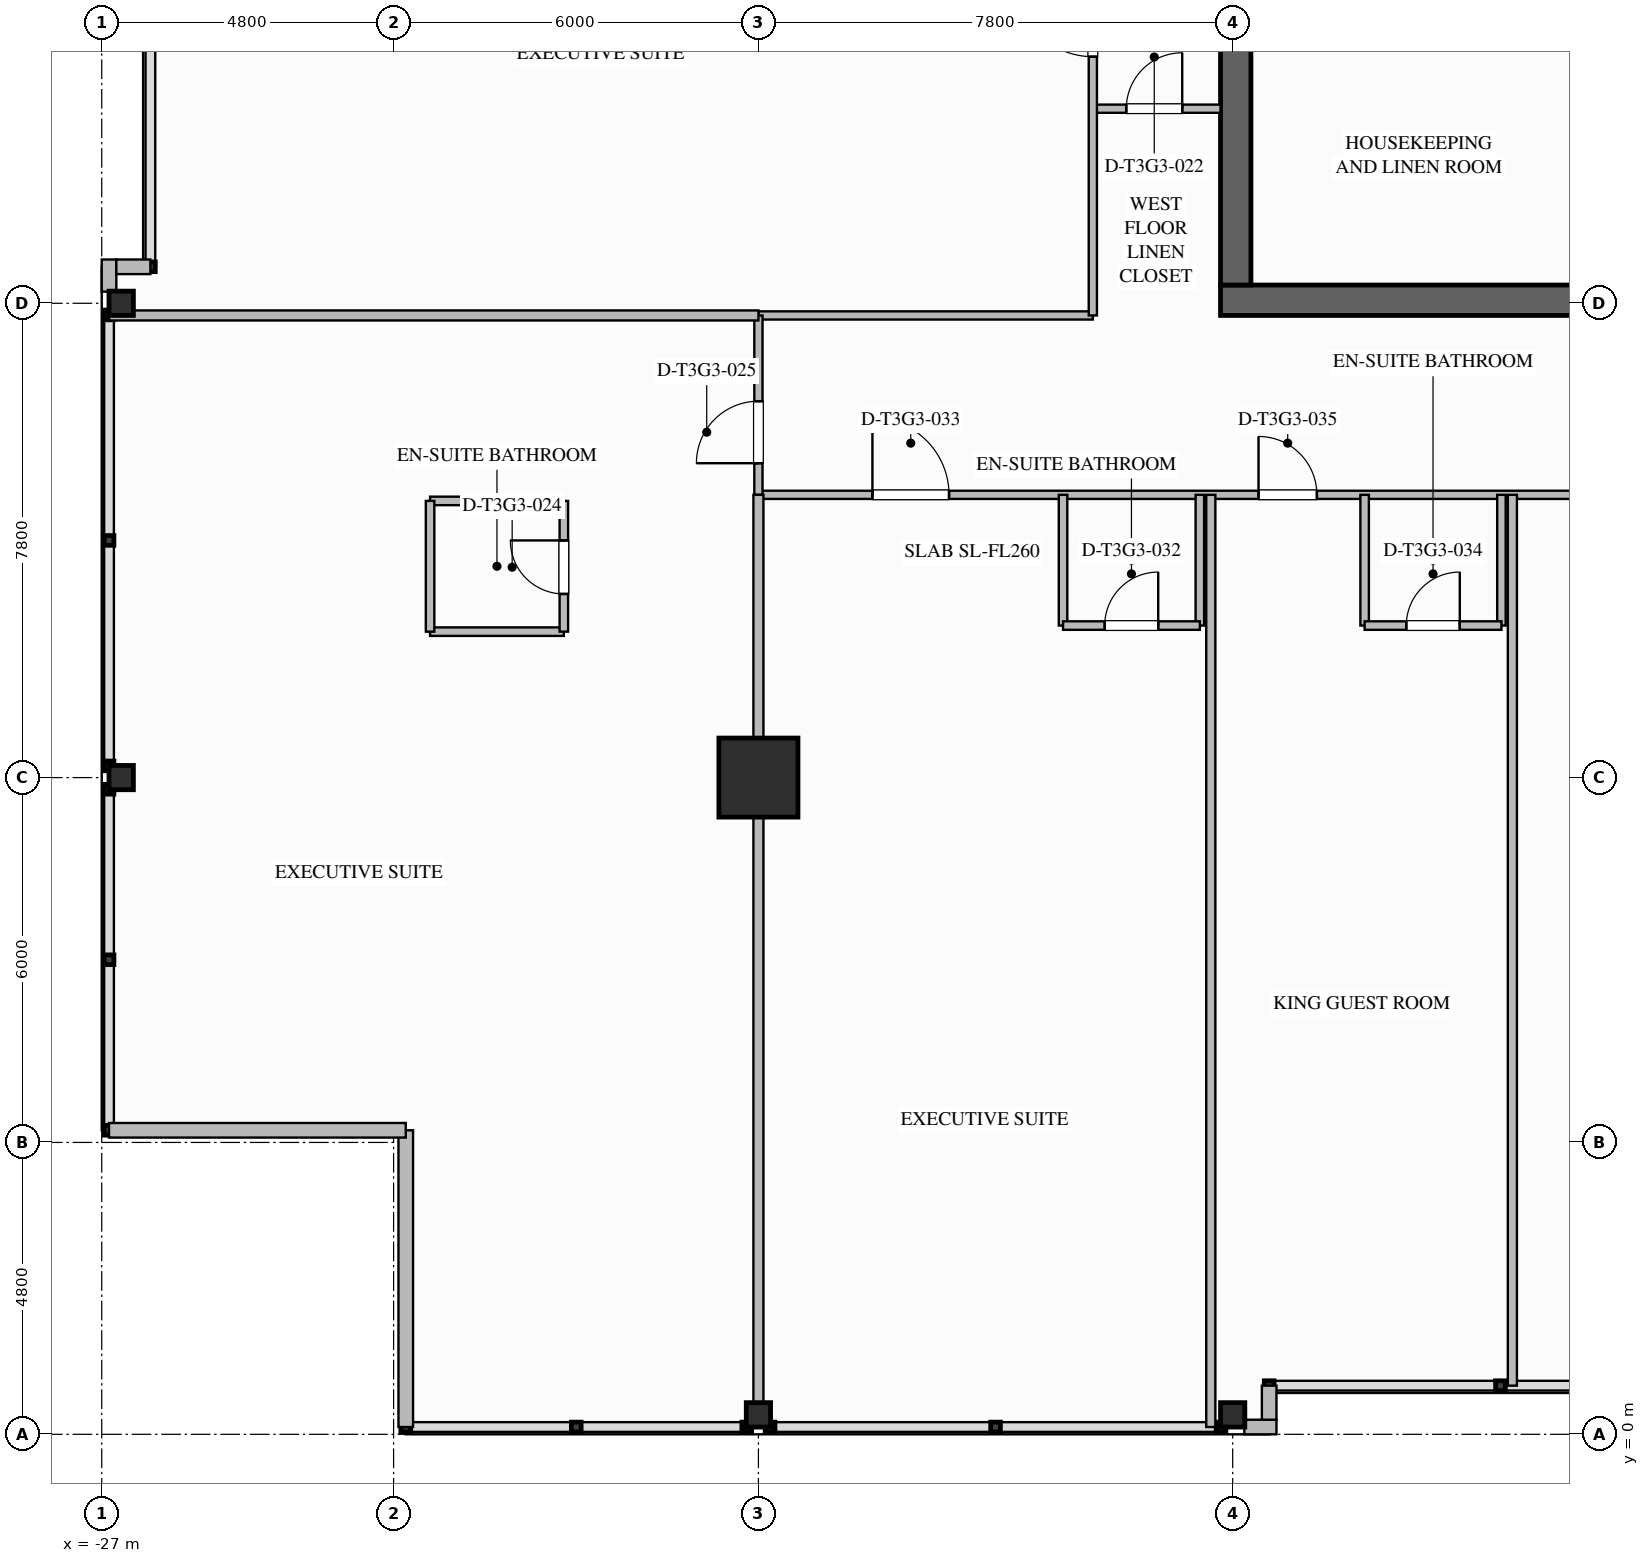
"""IFC4 building model, lengths in metres.
Left out: names, types, materials, properties, quantities, classifications, styles, units other than length and angle.
Written with IfcOpenShell. Run it as: python <this file> out.ifc"""

import sys

from ifc_helpers import new_model, si_unit, direction, frame, frame_2d, origin, origin_2d, place, context, subcontext, project, spatial, rectangle, i_section, extrude, element, fill, save


model = new_model("IFC4")
c1 = context("Model", 3, precision=1e-05, world=origin(), true_north=direction((0.0, 1.0)))
c2 = subcontext(c1, "Body", "Model", "MODEL_VIEW")
j1 = project(units=[si_unit("LENGTHUNIT", "METRE"), si_unit("PLANEANGLEUNIT", "RADIAN")], contexts=[c1])
p1 = place(None, origin())
s1 = spatial("IfcSite", under=j1, at=p1, CompositionType="ELEMENT")
p2 = place(p1, origin())
s2 = spatial("IfcBuilding", under=s1, at=p2, CompositionType="ELEMENT")
p3 = place(p2, frame((0.0, 0.0, 178.8)))
s3 = spatial("IfcBuildingStorey", under=s2, at=p3, CompositionType="ELEMENT", Elevation=178.8)
p4 = place(p3, frame((8.6, 18.65, 0.0), z_axis=(0.0, 0.0, 1.0), x_axis=(-1.0, 0.0, 0.0)))
e1 = element("IfcWall", 1, at=p4, inside=s3, PredefinedType="SHEAR", context=c2, shape_type="SweptSolid", body=[
    extrude(rectangle(XDim=17.2, YDim=0.5, at=frame_2d((8.6, 0.0))), origin(), (0.0, 0.0, 1.0), 3.55),
])
p5 = place(p3, frame((-8.35, 18.9, 0.0), z_axis=(0.0, 0.0, 1.0), x_axis=(0.0, 1.0, 0.0)))
e2 = element("IfcWall", 2, at=p5, inside=s3, PredefinedType="SHEAR", context=c2, shape_type="SweptSolid", body=[
    extrude(rectangle(XDim=16.2, YDim=0.5, at=frame_2d((8.1, 0.0))), origin(), (0.0, 0.0, 1.0), 3.55),
])
p6 = place(p5, frame((12.02, 0.0, 0.0)))
e3 = element("IfcOpeningElement", 3, at=p6, cuts=e2, PredefinedType="OPENING", context=c2, shape_type="SweptSolid", body=[
    extrude(rectangle(XDim=1.08, YDim=2.04, at=frame_2d((0.54, 1.02))), frame((0.0, 0.26, 0.0), z_axis=(0.0, -1.0, 0.0), x_axis=(1.0, 0.0, 0.0)), (0.0, 0.0, 1.0), 0.52),
])
p7 = place(p5, frame((4.5, 0.0, 0.0)))
e4 = element("IfcOpeningElement", 4, at=p7, cuts=e2, PredefinedType="OPENING", context=c2, shape_type="SweptSolid", body=[
    extrude(rectangle(XDim=1.08, YDim=2.04, at=frame_2d((0.54, 1.02))), frame((0.0, 0.26, 0.0), z_axis=(0.0, -1.0, 0.0), x_axis=(1.0, 0.0, 0.0)), (0.0, 0.0, 1.0), 0.52),
])
p8 = place(p3, frame((-16.2, 10.8, 0.0), z_axis=(0.0, 0.0, 1.0), x_axis=(1.0, 0.0, 0.0)))
e5 = element("IfcColumn", 5, at=p8, inside=s3, PredefinedType="COLUMN", context=c2, shape_type="SweptSolid", body=[
    extrude(rectangle(XDim=1.3, YDim=1.3, at=origin_2d()), origin(), (0.0, 0.0, 1.0), 3.55),
])
for number, where, z_axis, x_axis in (
    (6, (-26.68, 10.8, 0.0), (0.0, 0.0, 1.0), (1.0, 0.0, 0.0)),
    (7, (-26.68, 18.6, 0.0), (0.0, 0.0, 1.0), (1.0, 0.0, 0.0)),
    (8, (-16.2, 0.32, 0.0), (0.0, 0.0, 1.0), (0.0, 1.0, 0.0)),
    (9, (-8.4, 0.32, 0.0), (0.0, 0.0, 1.0), (0.0, 1.0, 0.0)),
):
    element("IfcColumn", number, at=place(p3, frame(where, z_axis=z_axis, x_axis=x_axis)), inside=s3, PredefinedType="COLUMN", context=c2, shape_type="SweptSolid", body=[
        extrude(i_section(OverallWidth=0.401, OverallDepth=0.399, WebThickness=0.025, FlangeThickness=0.04, FilletRadius=0.025, at=origin_2d()), origin(), (0.0, 0.0, 1.0), 3.547),
    ])
for number, where, z_axis, x_axis in (
    (10, (-26.88, 18.792, 0.0), (0.0, 0.0, 1.0), (0.0, 1.0, 0.0)),
    (11, (-7.68, 0.12, 0.0), (0.0, 0.0, 1.0), (-1.0, 0.0, 0.0)),
):
    element("IfcWall", number, at=place(p3, frame(where, z_axis=z_axis, x_axis=x_axis)), inside=s3, PredefinedType="STANDARD", context=c2, shape_type="SweptSolid", body=[
        extrude(rectangle(XDim=0.528, YDim=0.24, at=frame_2d((0.264, 0.0))), origin(), (0.0, 0.0, 1.0), 3.29),
    ])
for number, where, z_axis, x_axis in (
    (12, (-22.0, 0.12, 0.0), (0.0, 0.0, 1.0), (0.0, 1.0, 0.0)),
    (13, (-22.0, 5.0, 0.0), (0.0, 0.0, 1.0), (-1.0, 0.0, 0.0)),
):
    element("IfcWall", number, at=place(p3, frame(where, z_axis=z_axis, x_axis=x_axis)), inside=s3, PredefinedType="STANDARD", context=c2, shape_type="SweptSolid", body=[
        extrude(rectangle(XDim=4.88, YDim=0.24, at=frame_2d((2.44, 0.0))), origin(), (0.0, 0.0, 1.0), 3.29),
    ])
for number, where, z_axis, x_axis in (
    (14, (-26.76, 19.2, 0.0), (0.0, 0.0, 1.0), (1.0, 0.0, 0.0)),
    (15, (-7.8, 0.8, 0.0), (0.0, 0.0, 1.0), (0.0, -1.0, 0.0)),
):
    element("IfcWall", number, at=place(p3, frame(where, z_axis=z_axis, x_axis=x_axis)), inside=s3, PredefinedType="STANDARD", context=c2, shape_type="SweptSolid", body=[
        extrude(rectangle(XDim=0.56, YDim=0.24, at=frame_2d((0.28, 0.0))), origin(), (0.0, 0.0, 1.0), 3.29),
    ])
p9 = place(p3, frame((-10.7, 21.8, 0.0), z_axis=(0.0, 0.0, 1.0), x_axis=(1.0, 0.0, 0.0)))
e16 = element("IfcWall", 16, at=p9, inside=s3, PredefinedType="PARTITIONING", context=c2, shape_type="SweptSolid", body=[
    extrude(rectangle(XDim=2.1, YDim=0.135, at=frame_2d((1.05, 0.0))), origin(), (0.0, 0.0, 1.0), 3.29),
])
p10 = place(p9, frame((0.55, 0.0, 0.0)))
e17 = element("IfcOpeningElement", 17, at=p10, cuts=e16, PredefinedType="OPENING", context=c2, shape_type="SweptSolid", body=[
    extrude(rectangle(XDim=0.92, YDim=2.1, at=frame_2d((0.46, 1.05))), frame((0.0, 0.077, 0.0), z_axis=(0.0, -1.0, 0.0), x_axis=(1.0, 0.0, 0.0)), (0.0, 0.0, 1.0), 0.155),
])
p11 = place(p3, frame((-16.2, 18.4, 0.0), z_axis=(0.0, 0.0, 1.0), x_axis=(1.0, 0.0, 0.0)))
e18 = element("IfcWall", 18, at=p11, inside=s3, PredefinedType="PARTITIONING", context=c2, shape_type="SweptSolid", body=[
    extrude(rectangle(XDim=5.5, YDim=0.135, at=frame_2d((2.75, 0.0))), origin(), (0.0, 0.0, 1.0), 2.667),
])
p12 = place(p3, frame((-16.2, 15.45, 0.0), z_axis=(0.0, 0.0, 1.0), x_axis=(1.0, 0.0, 0.0)))
e19 = element("IfcWall", 19, at=p12, inside=s3, PredefinedType="PARTITIONING", context=c2, shape_type="SweptSolid", body=[
    extrude(rectangle(XDim=24.8, YDim=0.135, at=frame_2d((12.4, 0.0))), origin(), (0.0, 0.0, 1.0), 3.29),
])
p13 = place(p12, frame((1.875, 0.0, 0.0)))
e20 = element("IfcOpeningElement", 20, at=p13, cuts=e19, PredefinedType="OPENING", context=c2, shape_type="SweptSolid", body=[
    extrude(rectangle(XDim=1.26, YDim=2.2, at=frame_2d((0.63, 1.1))), frame((0.0, 0.077, 0.0), z_axis=(0.0, -1.0, 0.0), x_axis=(1.0, 0.0, 0.0)), (0.0, 0.0, 1.0), 0.155),
])
p14 = place(p12, frame((8.225, 0.0, 0.0)))
e21 = element("IfcOpeningElement", 21, at=p14, cuts=e19, PredefinedType="OPENING", context=c2, shape_type="SweptSolid", body=[
    extrude(rectangle(XDim=0.96, YDim=2.15, at=frame_2d((0.48, 1.075))), frame((0.0, 0.077, 0.0), z_axis=(0.0, -1.0, 0.0), x_axis=(1.0, 0.0, 0.0)), (0.0, 0.0, 1.0), 0.155),
])
p15 = place(p12, frame((13.745, 0.0, 0.0)))
e22 = element("IfcOpeningElement", 22, at=p15, cuts=e19, PredefinedType="OPENING", context=c2, shape_type="SweptSolid", body=[
    extrude(rectangle(XDim=1.26, YDim=2.2, at=frame_2d((0.63, 1.1))), frame((0.0, 0.077, 0.0), z_axis=(0.0, -1.0, 0.0), x_axis=(1.0, 0.0, 0.0)), (0.0, 0.0, 1.0), 0.155),
])
p16 = place(p12, frame((19.945, 0.0, 0.0)))
e23 = element("IfcOpeningElement", 23, at=p16, cuts=e19, PredefinedType="OPENING", context=c2, shape_type="SweptSolid", body=[
    extrude(rectangle(XDim=1.26, YDim=2.2, at=frame_2d((0.63, 1.1))), frame((0.0, 0.077, 0.0), z_axis=(0.0, -1.0, 0.0), x_axis=(1.0, 0.0, 0.0)), (0.0, 0.0, 1.0), 0.155),
])
p17 = place(p3, frame((-10.7, 18.4, 0.0), z_axis=(0.0, 0.0, 1.0), x_axis=(0.0, 1.0, 0.0)))
e24 = element("IfcWall", 24, at=p17, inside=s3, PredefinedType="PARTITIONING", context=c2, shape_type="SweptSolid", body=[
    extrude(rectangle(XDim=17.2, YDim=0.135, at=frame_2d((8.6, 0.0))), origin(), (0.0, 0.0, 1.0), 3.29),
])
p18 = place(p17, frame((4.255, 0.0, 0.0)))
e25 = element("IfcOpeningElement", 25, at=p18, cuts=e24, PredefinedType="OPENING", context=c2, shape_type="SweptSolid", body=[
    extrude(rectangle(XDim=1.26, YDim=2.2, at=frame_2d((0.63, 1.1))), frame((0.0, 0.077, 0.0), z_axis=(0.0, -1.0, 0.0), x_axis=(1.0, 0.0, 0.0)), (0.0, 0.0, 1.0), 0.155),
])
p19 = place(p17, frame((9.255, 0.0, 0.0)))
e26 = element("IfcOpeningElement", 26, at=p19, cuts=e24, PredefinedType="OPENING", context=c2, shape_type="SweptSolid", body=[
    extrude(rectangle(XDim=1.26, YDim=2.2, at=frame_2d((0.63, 1.1))), frame((0.0, 0.077, 0.0), z_axis=(0.0, -1.0, 0.0), x_axis=(1.0, 0.0, 0.0)), (0.0, 0.0, 1.0), 0.155),
])
p20 = place(p3, frame((-16.2, 15.45, 0.0), z_axis=(0.0, 0.0, 1.0), x_axis=(0.0, 1.0, 0.0)))
e27 = element("IfcWall", 27, at=p20, inside=s3, PredefinedType="PARTITIONING", context=c2, shape_type="SweptSolid", body=[
    extrude(rectangle(XDim=2.95, YDim=0.135, at=frame_2d((1.475, 0.0))), origin(), (0.0, 0.0, 1.0), 2.58),
])
p21 = place(p20, frame((0.52, 0.0, 0.0)))
e28 = element("IfcOpeningElement", 28, at=p21, cuts=e27, PredefinedType="OPENING", context=c2, shape_type="SweptSolid", body=[
    extrude(rectangle(XDim=1.02, YDim=2.15, at=frame_2d((0.51, 1.075))), frame((0.0, 0.077, 0.0), z_axis=(0.0, -1.0, 0.0), x_axis=(1.0, 0.0, 0.0)), (0.0, 0.0, 1.0), 0.155),
])
p22 = place(p3, frame((-16.2, 0.12, 0.0), z_axis=(0.0, 0.0, 1.0), x_axis=(0.0, 1.0, 0.0)))
e29 = element("IfcWall", 29, at=p22, inside=s3, PredefinedType="PARTITIONING", context=c2, shape_type="SweptSolid", body=[
    extrude(rectangle(XDim=15.33, YDim=0.165, at=frame_2d((7.665, 0.0))), origin(), (0.0, 0.0, 1.0), 2.58),
])
p23 = place(p3, frame((-26.88, 18.4, 0.0), z_axis=(0.0, 0.0, 1.0), x_axis=(1.0, 0.0, 0.0)))
e30 = element("IfcWall", 30, at=p23, inside=s3, PredefinedType="PARTITIONING", context=c2, shape_type="SweptSolid", body=[
    extrude(rectangle(XDim=10.68, YDim=0.165, at=frame_2d((5.34, 0.0))), origin(), (0.0, 0.0, 1.0), 2.58),
])
for number, where, z_axis, x_axis in (
    (31, (-21.6, 13.2, 0.0), (0.0, 0.0, 1.0), (1.0, 0.0, 0.0)),
    (32, (-21.6, 15.35, 0.0), (0.0, 0.0, 1.0), (1.0, 0.0, 0.0)),
):
    element("IfcWall", number, at=place(p3, frame(where, z_axis=z_axis, x_axis=x_axis)), inside=s3, PredefinedType="PLUMBINGWALL", context=c2, shape_type="SweptSolid", body=[
        extrude(rectangle(XDim=2.2, YDim=0.14, at=frame_2d((1.1, 0.0))), origin(), (0.0, 0.0, 1.0), 3.29),
    ])
p24 = place(p3, frame((-21.6, 13.2, 0.0), z_axis=(0.0, 0.0, 1.0), x_axis=(0.0, 1.0, 0.0)))
e33 = element("IfcWall", 33, at=p24, inside=s3, PredefinedType="PLUMBINGWALL", context=c2, shape_type="SweptSolid", body=[
    extrude(rectangle(XDim=2.15, YDim=0.14, at=frame_2d((1.075, 0.0))), origin(), (0.0, 0.0, 1.0), 3.29),
])
p25 = place(p3, frame((-19.4, 13.2, 0.0), z_axis=(0.0, 0.0, 1.0), x_axis=(0.0, 1.0, 0.0)))
e34 = element("IfcWall", 34, at=p25, inside=s3, PredefinedType="PLUMBINGWALL", context=c2, shape_type="SweptSolid", body=[
    extrude(rectangle(XDim=2.15, YDim=0.14, at=frame_2d((1.075, 0.0))), origin(), (0.0, 0.0, 1.0), 3.29),
])
p26 = place(p25, frame((0.62, 0.0, 0.0)))
e35 = element("IfcOpeningElement", 35, at=p26, cuts=e34, PredefinedType="OPENING", context=c2, shape_type="SweptSolid", body=[
    extrude(rectangle(XDim=0.88, YDim=2.1, at=frame_2d((0.44, 1.05))), frame((0.0, 0.08, 0.0), z_axis=(0.0, -1.0, 0.0), x_axis=(1.0, 0.0, 0.0)), (0.0, 0.0, 1.0), 0.16),
])
for number, where, z_axis, x_axis in (
    (36, (-11.19, 15.45, 0.0), (0.0, 0.0, 1.0), (0.0, -1.0, 0.0)),
    (37, (-8.94, 15.45, 0.0), (0.0, 0.0, 1.0), (0.0, -1.0, 0.0)),
):
    element("IfcWall", number, at=place(p3, frame(where, z_axis=z_axis, x_axis=x_axis)), inside=s3, PredefinedType="PLUMBINGWALL", context=c2, shape_type="SweptSolid", body=[
        extrude(rectangle(XDim=2.15, YDim=0.14, at=frame_2d((1.075, 0.0))), origin(), (0.0, 0.0, 1.0), 3.29),
    ])
p27 = place(p3, frame((-11.19, 13.3, 0.0), z_axis=(0.0, 0.0, 1.0), x_axis=(1.0, 0.0, 0.0)))
e38 = element("IfcWall", 38, at=p27, inside=s3, PredefinedType="PLUMBINGWALL", context=c2, shape_type="SweptSolid", body=[
    extrude(rectangle(XDim=2.25, YDim=0.14, at=frame_2d((1.125, 0.0))), origin(), (0.0, 0.0, 1.0), 3.29),
])
p28 = place(p27, frame((0.685, 0.0, 0.0)))
e39 = element("IfcOpeningElement", 39, at=p28, cuts=e38, PredefinedType="OPENING", context=c2, shape_type="SweptSolid", body=[
    extrude(rectangle(XDim=0.88, YDim=2.1, at=frame_2d((0.44, 1.05))), frame((0.0, 0.08, 0.0), z_axis=(0.0, -1.0, 0.0), x_axis=(1.0, 0.0, 0.0)), (0.0, 0.0, 1.0), 0.16),
])
p29 = place(p3, frame((-8.76, 0.12, 0.0), z_axis=(0.0, 0.0, 1.0), x_axis=(0.0, 1.0, 0.0)))
e40 = element("IfcWall", 40, at=p29, inside=s3, PredefinedType="PARTITIONING", context=c2, shape_type="SweptSolid", body=[
    extrude(rectangle(XDim=15.33, YDim=0.15, at=frame_2d((7.665, 0.0))), origin(), (0.0, 0.0, 1.0), 3.29),
])
for number, where, z_axis, x_axis in (
    (41, (-6.23, 15.45, 0.0), (0.0, 0.0, 1.0), (0.0, -1.0, 0.0)),
    (42, (-3.98, 15.45, 0.0), (0.0, 0.0, 1.0), (0.0, -1.0, 0.0)),
):
    element("IfcWall", number, at=place(p3, frame(where, z_axis=z_axis, x_axis=x_axis)), inside=s3, PredefinedType="PLUMBINGWALL", context=c2, shape_type="SweptSolid", body=[
        extrude(rectangle(XDim=2.15, YDim=0.14, at=frame_2d((1.075, 0.0))), origin(), (0.0, 0.0, 1.0), 3.29),
    ])
p30 = place(p3, frame((-6.23, 13.3, 0.0), z_axis=(0.0, 0.0, 1.0), x_axis=(1.0, 0.0, 0.0)))
e43 = element("IfcWall", 43, at=p30, inside=s3, PredefinedType="PLUMBINGWALL", context=c2, shape_type="SweptSolid", body=[
    extrude(rectangle(XDim=2.25, YDim=0.14, at=frame_2d((1.125, 0.0))), origin(), (0.0, 0.0, 1.0), 3.29),
])
p31 = place(p30, frame((0.685, 0.0, 0.0)))
e44 = element("IfcOpeningElement", 44, at=p31, cuts=e43, PredefinedType="OPENING", context=c2, shape_type="SweptSolid", body=[
    extrude(rectangle(XDim=0.88, YDim=2.1, at=frame_2d((0.44, 1.05))), frame((0.0, 0.08, 0.0), z_axis=(0.0, -1.0, 0.0), x_axis=(1.0, 0.0, 0.0)), (0.0, 0.0, 1.0), 0.16),
])
p32 = place(p3, frame((-3.8, 0.8, 0.0), z_axis=(0.0, 0.0, 1.0), x_axis=(0.0, 1.0, 0.0)))
e45 = element("IfcWall", 45, at=p32, inside=s3, PredefinedType="PARTITIONING", context=c2, shape_type="SweptSolid", body=[
    extrude(rectangle(XDim=14.65, YDim=0.15, at=frame_2d((7.325, 0.0))), origin(), (0.0, 0.0, 1.0), 3.29),
])
p33 = place(p10, origin())
e46 = element("IfcDoor", 46, at=p33, inside=s3, OperationType="SINGLE_SWING_RIGHT", PredefinedType="DOOR", context=c2, shape_type="SweptSolid", body=[
    extrude(rectangle(XDim=0.92, YDim=2.1, at=frame_2d((0.46, 1.05))), frame((0.0, 0.025, 0.0), z_axis=(0.0, -1.0, 0.0), x_axis=(1.0, 0.0, 0.0)), (0.0, 0.0, 1.0), 0.05),
])
fill(e17, e46)
p34 = place(p26, origin())
e47 = element("IfcDoor", 47, at=p34, inside=s3, OperationType="SINGLE_SWING_RIGHT", PredefinedType="DOOR", context=c2, shape_type="SweptSolid", body=[
    extrude(rectangle(XDim=0.88, YDim=2.1, at=frame_2d((0.44, 1.05))), frame((0.0, 0.025, 0.0), z_axis=(0.0, -1.0, 0.0), x_axis=(1.0, 0.0, 0.0)), (0.0, 0.0, 1.0), 0.05),
])
fill(e35, e47)
p35 = place(p21, origin())
e48 = element("IfcDoor", 48, at=p35, inside=s3, OperationType="SINGLE_SWING_LEFT", PredefinedType="DOOR", context=c2, shape_type="SweptSolid", body=[
    extrude(rectangle(XDim=1.02, YDim=2.15, at=frame_2d((0.51, 1.075))), frame((0.0, 0.025, 0.0), z_axis=(0.0, -1.0, 0.0), x_axis=(1.0, 0.0, 0.0)), (0.0, 0.0, 1.0), 0.05),
])
fill(e28, e48)
p36 = place(p28, origin())
e49 = element("IfcDoor", 49, at=p36, inside=s3, OperationType="SINGLE_SWING_RIGHT", PredefinedType="DOOR", context=c2, shape_type="SweptSolid", body=[
    extrude(rectangle(XDim=0.88, YDim=2.1, at=frame_2d((0.44, 1.05))), frame((0.0, 0.025, 0.0), z_axis=(0.0, -1.0, 0.0), x_axis=(1.0, 0.0, 0.0)), (0.0, 0.0, 1.0), 0.05),
])
fill(e39, e49)
p37 = place(p13, origin())
e50 = element("IfcDoor", 50, at=p37, inside=s3, OperationType="SINGLE_SWING_LEFT", PredefinedType="DOOR", context=c2, shape_type="SweptSolid", body=[
    extrude(rectangle(XDim=1.26, YDim=2.2, at=frame_2d((0.63, 1.1))), frame((0.0, 0.025, 0.0), z_axis=(0.0, -1.0, 0.0), x_axis=(1.0, 0.0, 0.0)), (0.0, 0.0, 1.0), 0.05),
])
fill(e20, e50)
p38 = place(p31, origin())
e51 = element("IfcDoor", 51, at=p38, inside=s3, OperationType="SINGLE_SWING_RIGHT", PredefinedType="DOOR", context=c2, shape_type="SweptSolid", body=[
    extrude(rectangle(XDim=0.88, YDim=2.1, at=frame_2d((0.44, 1.05))), frame((0.0, 0.025, 0.0), z_axis=(0.0, -1.0, 0.0), x_axis=(1.0, 0.0, 0.0)), (0.0, 0.0, 1.0), 0.05),
])
fill(e44, e51)
p39 = place(p14, origin())
e52 = element("IfcDoor", 52, at=p39, inside=s3, OperationType="SINGLE_SWING_LEFT", PredefinedType="DOOR", context=c2, shape_type="SweptSolid", body=[
    extrude(rectangle(XDim=0.96, YDim=2.15, at=frame_2d((0.48, 1.075))), frame((0.0, 0.025, 0.0), z_axis=(0.0, -1.0, 0.0), x_axis=(1.0, 0.0, 0.0)), (0.0, 0.0, 1.0), 0.05),
])
fill(e21, e52)
p40 = place(p18, origin())
e53 = element("IfcDoor", 53, at=p40, inside=s3, OperationType="SINGLE_SWING_RIGHT", PredefinedType="DOOR", context=c2, shape_type="SweptSolid", body=[
    extrude(rectangle(XDim=1.26, YDim=2.2, at=frame_2d((0.63, 1.1))), frame((0.0, 0.025, 0.0), z_axis=(0.0, -1.0, 0.0), x_axis=(1.0, 0.0, 0.0)), (0.0, 0.0, 1.0), 0.05),
])
fill(e25, e53)
save(model, sys.argv[1])
